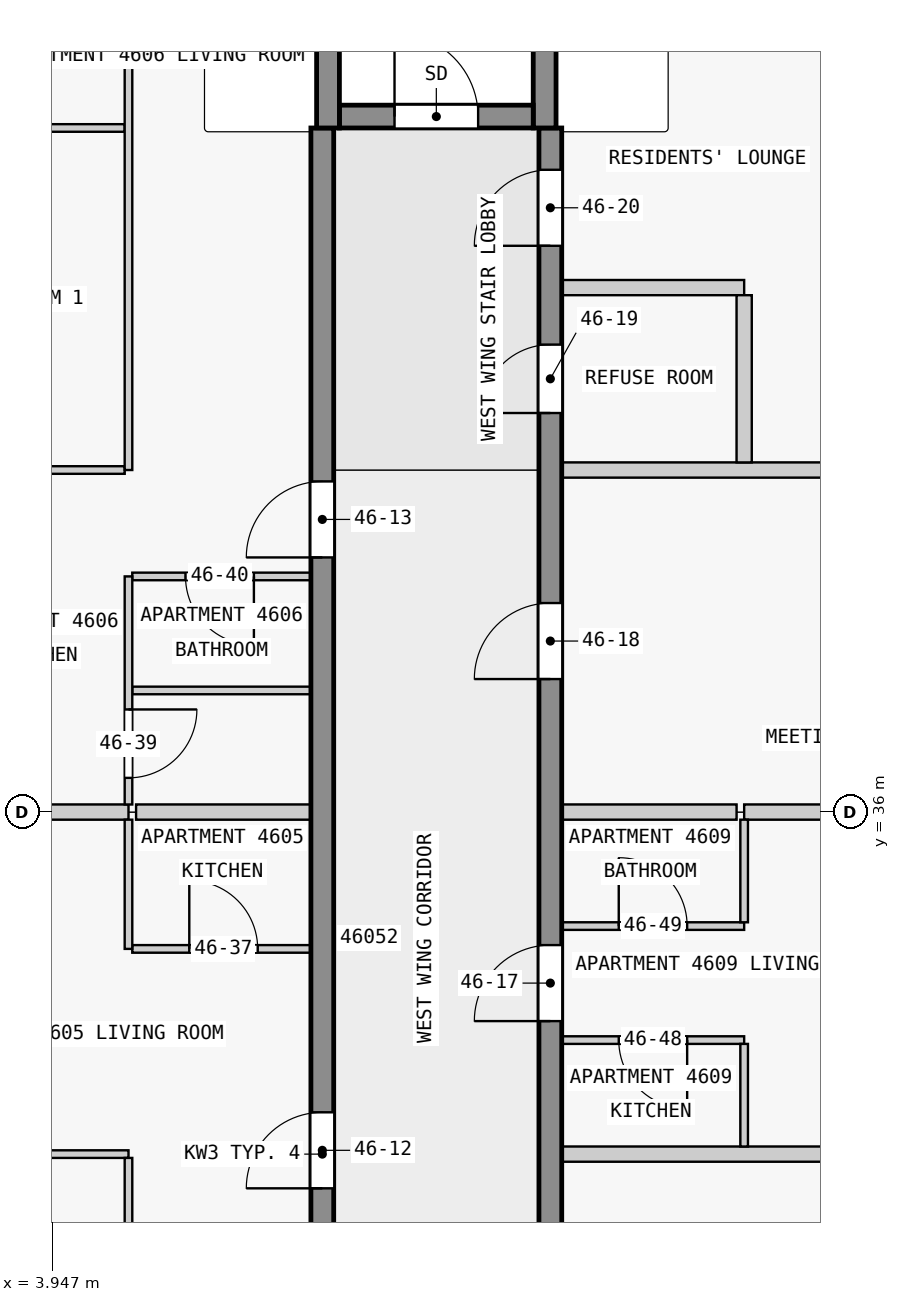
"""IFC4 building model, lengths in metres.
Left out: names, types, materials, properties, quantities, classifications, styles, units other than length and angle.
Written with IfcOpenShell. Run it as: python <this file> out.ifc"""

import sys

from ifc_helpers import new_model, si_unit, direction, frame, frame_2d, origin, place, context, subcontext, project, spatial, rectangle, extrude, element, fill, save


model = new_model("IFC4")
c1 = context("Model", 3, precision=1e-05, world=origin(), true_north=direction((0.0, 1.0)))
c2 = subcontext(c1, "Body", "Model", "MODEL_VIEW")
j1 = project(units=[si_unit("LENGTHUNIT", "METRE"), si_unit("PLANEANGLEUNIT", "RADIAN")], contexts=[c1])
p1 = place(None, origin())
s1 = spatial("IfcSite", under=j1, at=p1, CompositionType="ELEMENT")
p2 = place(p1, origin())
s2 = spatial("IfcBuilding", under=s1, at=p2, CompositionType="ELEMENT")
p3 = place(p2, frame((0.0, 0.0, 177.9)))
s3 = spatial("IfcBuildingStorey", under=s2, at=p3, CompositionType="ELEMENT", Elevation=177.9)
p4 = place(p3, frame((7.725, 45.15, 0.0), z_axis=(0.0, 0.0, 1.0), x_axis=(1.0, 0.0, 0.0)))
e1 = element("IfcWall", 1, at=p4, inside=s3, PredefinedType="SHEAR", context=c2, shape_type="SweptSolid", body=[
    extrude(rectangle(XDim=2.55, YDim=0.3, at=frame_2d((1.275, 0.0))), origin(), (0.0, 0.0, 1.0), 3.5),
])
p5 = place(p4, frame((0.725, 0.0, 0.0)))
e2 = element("IfcOpeningElement", 2, at=p5, cuts=e1, PredefinedType="OPENING", context=c2, shape_type="SweptSolid", body=[
    extrude(rectangle(XDim=1.1, YDim=2.1, at=frame_2d((0.55, 1.05))), frame((0.0, 0.16, 0.0), z_axis=(0.0, -1.0, 0.0), x_axis=(1.0, 0.0, 0.0)), (0.0, 0.0, 1.0), 0.32),
])
for number, where, z_axis, x_axis in (
    (3, (7.575, 45.0, 0.0), (0.0, 0.0, 1.0), (0.0, 1.0, 0.0)),
    (4, (10.425, 45.0, 0.0), (0.0, 0.0, 1.0), (0.0, 1.0, 0.0)),
):
    element("IfcWall", number, at=place(p3, frame(where, z_axis=z_axis, x_axis=x_axis)), inside=s3, PredefinedType="SHEAR", context=c2, shape_type="SweptSolid", body=[
        extrude(rectangle(XDim=7.2, YDim=0.3, at=frame_2d((3.6, 0.0))), origin(), (0.0, 0.0, 1.0), 3.5),
    ])
p6 = place(p3, frame((7.5, 18.0, 0.0), z_axis=(0.0, 0.0, 1.0), x_axis=(0.0, 1.0, 0.0)))
e5 = element("IfcWall", 5, at=p6, inside=s3, PredefinedType="SHEAR", context=c2, shape_type="SweptSolid", body=[
    extrude(rectangle(XDim=27.0, YDim=0.3, at=frame_2d((13.5, 0.0))), origin(), (0.0, 0.0, 1.0), 3.25),
])
p7 = place(p6, frame((1.75, 0.0, 0.0)))
e6 = element("IfcOpeningElement", 6, at=p7, cuts=e5, PredefinedType="OPENING", context=c2, shape_type="SweptSolid", body=[
    extrude(rectangle(XDim=1.0, YDim=2.1, at=frame_2d((0.5, 1.05))), frame((0.0, 0.16, 0.0), z_axis=(0.0, -1.0, 0.0), x_axis=(1.0, 0.0, 0.0)), (0.0, 0.0, 1.0), 0.32),
])
p8 = place(p6, frame((5.85, 0.0, 0.0)))
e7 = element("IfcOpeningElement", 7, at=p8, cuts=e5, PredefinedType="OPENING", context=c2, shape_type="SweptSolid", body=[
    extrude(rectangle(XDim=1.8, YDim=2.1, at=frame_2d((0.9, 1.05))), frame((0.0, 0.16, 0.0), z_axis=(0.0, -1.0, 0.0), x_axis=(1.0, 0.0, 0.0)), (0.0, 0.0, 1.0), 0.32),
])
p9 = place(p6, frame((13.05, 0.0, 0.0)))
e8 = element("IfcOpeningElement", 8, at=p9, cuts=e5, PredefinedType="OPENING", context=c2, shape_type="SweptSolid", body=[
    extrude(rectangle(XDim=1.0, YDim=2.1, at=frame_2d((0.5, 1.05))), frame((0.0, 0.16, 0.0), z_axis=(0.0, -1.0, 0.0), x_axis=(1.0, 0.0, 0.0)), (0.0, 0.0, 1.0), 0.32),
])
p10 = place(p6, frame((21.35, 0.0, 0.0)))
e9 = element("IfcOpeningElement", 9, at=p10, cuts=e5, PredefinedType="OPENING", context=c2, shape_type="SweptSolid", body=[
    extrude(rectangle(XDim=1.0, YDim=2.1, at=frame_2d((0.5, 1.05))), frame((0.0, 0.16, 0.0), z_axis=(0.0, -1.0, 0.0), x_axis=(1.0, 0.0, 0.0)), (0.0, 0.0, 1.0), 0.32),
])
p11 = place(p3, frame((10.5, 18.0, 0.0), z_axis=(0.0, 0.0, 1.0), x_axis=(0.0, 1.0, 0.0)))
e10 = element("IfcWall", 10, at=p11, inside=s3, PredefinedType="SHEAR", context=c2, shape_type="SweptSolid", body=[
    extrude(rectangle(XDim=27.0, YDim=0.3, at=frame_2d((13.5, 0.0))), origin(), (0.0, 0.0, 1.0), 3.25),
])
p12 = place(p11, frame((1.75, 0.0, 0.0)))
e11 = element("IfcOpeningElement", 11, at=p12, cuts=e10, PredefinedType="OPENING", context=c2, shape_type="SweptSolid", body=[
    extrude(rectangle(XDim=1.0, YDim=2.1, at=frame_2d((0.5, 1.05))), frame((0.0, 0.16, 0.0), z_axis=(0.0, -1.0, 0.0), x_axis=(1.0, 0.0, 0.0)), (0.0, 0.0, 1.0), 0.32),
])
p13 = place(p11, frame((6.25, 0.0, 0.0)))
e12 = element("IfcOpeningElement", 12, at=p13, cuts=e10, PredefinedType="OPENING", context=c2, shape_type="SweptSolid", body=[
    extrude(rectangle(XDim=1.0, YDim=2.1, at=frame_2d((0.5, 1.05))), frame((0.0, 0.16, 0.0), z_axis=(0.0, -1.0, 0.0), x_axis=(1.0, 0.0, 0.0)), (0.0, 0.0, 1.0), 0.32),
])
p14 = place(p11, frame((10.75, 0.0, 0.0)))
e13 = element("IfcOpeningElement", 13, at=p14, cuts=e10, PredefinedType="OPENING", context=c2, shape_type="SweptSolid", body=[
    extrude(rectangle(XDim=1.0, YDim=2.1, at=frame_2d((0.5, 1.05))), frame((0.0, 0.16, 0.0), z_axis=(0.0, -1.0, 0.0), x_axis=(1.0, 0.0, 0.0)), (0.0, 0.0, 1.0), 0.32),
])
p15 = place(p11, frame((15.25, 0.0, 0.0)))
e14 = element("IfcOpeningElement", 14, at=p15, cuts=e10, PredefinedType="OPENING", context=c2, shape_type="SweptSolid", body=[
    extrude(rectangle(XDim=1.0, YDim=2.1, at=frame_2d((0.5, 1.05))), frame((0.0, 0.16, 0.0), z_axis=(0.0, -1.0, 0.0), x_axis=(1.0, 0.0, 0.0)), (0.0, 0.0, 1.0), 0.32),
])
p16 = place(p11, frame((19.75, 0.0, 0.0)))
e15 = element("IfcOpeningElement", 15, at=p16, cuts=e10, PredefinedType="OPENING", context=c2, shape_type="SweptSolid", body=[
    extrude(rectangle(XDim=1.0, YDim=2.1, at=frame_2d((0.5, 1.05))), frame((0.0, 0.16, 0.0), z_axis=(0.0, -1.0, 0.0), x_axis=(1.0, 0.0, 0.0)), (0.0, 0.0, 1.0), 0.32),
])
p17 = place(p11, frame((23.25, 0.0, 0.0)))
e16 = element("IfcOpeningElement", 16, at=p17, cuts=e10, PredefinedType="OPENING", context=c2, shape_type="SweptSolid", body=[
    extrude(rectangle(XDim=0.9, YDim=2.1, at=frame_2d((0.45, 1.05))), frame((0.0, 0.16, 0.0), z_axis=(0.0, -1.0, 0.0), x_axis=(1.0, 0.0, 0.0)), (0.0, 0.0, 1.0), 0.32),
])
p18 = place(p11, frame((25.45, 0.0, 0.0)))
e17 = element("IfcOpeningElement", 17, at=p18, cuts=e10, PredefinedType="OPENING", context=c2, shape_type="SweptSolid", body=[
    extrude(rectangle(XDim=1.0, YDim=2.1, at=frame_2d((0.5, 1.05))), frame((0.0, 0.16, 0.0), z_axis=(0.0, -1.0, 0.0), x_axis=(1.0, 0.0, 0.0)), (0.0, 0.0, 1.0), 0.32),
])
p19 = place(p3, frame((4.95, 31.5, 0.0), z_axis=(0.0, 0.0, 1.0), x_axis=(-1.0, 0.0, 0.0)))
e18 = element("IfcWall", 18, at=p19, inside=s3, PredefinedType="PARTITIONING", context=c2, shape_type="SweptSolid", body=[
    extrude(rectangle(XDim=4.8, YDim=0.1, at=frame_2d((2.4, 0.0))), origin(), (0.0, 0.0, 1.0), 3.25),
])
p20 = place(p19, frame((1.95, 0.0, 0.0)))
e19 = element("IfcOpeningElement", 19, at=p20, cuts=e18, PredefinedType="OPENING", context=c2, shape_type="SweptSolid", body=[
    extrude(rectangle(XDim=0.9, YDim=2.1, at=frame_2d((0.45, 1.05))), frame((0.0, 0.06, 0.0), z_axis=(0.0, -1.0, 0.0), x_axis=(1.0, 0.0, 0.0)), (0.0, 0.0, 1.0), 0.12),
])
p21 = place(p3, frame((17.85, 31.5, 0.0), z_axis=(0.0, 0.0, 1.0), x_axis=(-1.0, 0.0, 0.0)))
e20 = element("IfcWall", 20, at=p21, inside=s3, PredefinedType="PARTITIONING", context=c2, shape_type="SweptSolid", body=[
    extrude(rectangle(XDim=7.2, YDim=0.2, at=frame_2d((3.6, 0.0))), origin(), (0.0, 0.0, 1.0), 3.25),
])
p22 = place(p3, frame((13.05, 33.0, 0.0), z_axis=(0.0, 0.0, 1.0), x_axis=(-1.0, 0.0, 0.0)))
e21 = element("IfcWall", 21, at=p22, inside=s3, PredefinedType="PARTITIONING", context=c2, shape_type="SweptSolid", body=[
    extrude(rectangle(XDim=2.4, YDim=0.1, at=frame_2d((1.2, 0.0))), origin(), (0.0, 0.0, 1.0), 3.25),
])
p23 = place(p22, frame((0.75, 0.0, 0.0)))
e22 = element("IfcOpeningElement", 22, at=p23, cuts=e21, PredefinedType="OPENING", context=c2, shape_type="SweptSolid", body=[
    extrude(rectangle(XDim=0.9, YDim=2.1, at=frame_2d((0.45, 1.05))), frame((0.0, 0.06, 0.0), z_axis=(0.0, -1.0, 0.0), x_axis=(1.0, 0.0, 0.0)), (0.0, 0.0, 1.0), 0.12),
])
p24 = place(p3, frame((5.0, 34.2, 0.0), z_axis=(0.0, 0.0, 1.0), x_axis=(1.0, 0.0, 0.0)))
e23 = element("IfcWall", 23, at=p24, inside=s3, PredefinedType="PARTITIONING", context=c2, shape_type="SweptSolid", body=[
    extrude(rectangle(XDim=2.35, YDim=0.1, at=frame_2d((1.175, 0.0))), origin(), (0.0, 0.0, 1.0), 3.25),
])
p25 = place(p24, frame((0.75, 0.0, 0.0)))
e24 = element("IfcOpeningElement", 24, at=p25, cuts=e23, PredefinedType="OPENING", context=c2, shape_type="SweptSolid", body=[
    extrude(rectangle(XDim=0.9, YDim=2.1, at=frame_2d((0.45, 1.05))), frame((0.0, 0.06, 0.0), z_axis=(0.0, -1.0, 0.0), x_axis=(1.0, 0.0, 0.0)), (0.0, 0.0, 1.0), 0.12),
])
p26 = place(p3, frame((10.65, 34.5, 0.0), z_axis=(0.0, 0.0, 1.0), x_axis=(1.0, 0.0, 0.0)))
e25 = element("IfcWall", 25, at=p26, inside=s3, PredefinedType="PARTITIONING", context=c2, shape_type="SweptSolid", body=[
    extrude(rectangle(XDim=2.4, YDim=0.1, at=frame_2d((1.2, 0.0))), origin(), (0.0, 0.0, 1.0), 3.25),
])
p27 = place(p26, frame((0.75, 0.0, 0.0)))
e26 = element("IfcOpeningElement", 26, at=p27, cuts=e25, PredefinedType="OPENING", context=c2, shape_type="SweptSolid", body=[
    extrude(rectangle(XDim=0.9, YDim=2.1, at=frame_2d((0.45, 1.05))), frame((0.0, 0.06, 0.0), z_axis=(0.0, -1.0, 0.0), x_axis=(1.0, 0.0, 0.0)), (0.0, 0.0, 1.0), 0.12),
])
for number, where, z_axis, x_axis in (
    (27, (7.35, 36.0, 0.0), (0.0, 0.0, 1.0), (-1.0, 0.0, 0.0)),
    (28, (12.95, 36.0, 0.0), (0.0, 0.0, 1.0), (-1.0, 0.0, 0.0)),
):
    element("IfcWall", number, at=place(p3, frame(where, z_axis=z_axis, x_axis=x_axis)), inside=s3, PredefinedType="PARTITIONING", context=c2, shape_type="SweptSolid", body=[
        extrude(rectangle(XDim=2.3, YDim=0.2, at=frame_2d((1.15, 0.0))), origin(), (0.0, 0.0, 1.0), 3.25),
    ])
for number, where, z_axis, x_axis in (
    (29, (1.4, 36.0, 0.0), (0.0, 0.0, 1.0), (1.0, 0.0, 0.0)),
    (30, (13.05, 36.0, 0.0), (0.0, 0.0, 1.0), (1.0, 0.0, 0.0)),
):
    element("IfcWall", number, at=place(p3, frame(where, z_axis=z_axis, x_axis=x_axis)), inside=s3, PredefinedType="PARTITIONING", context=c2, shape_type="SweptSolid", body=[
        extrude(rectangle(XDim=3.55, YDim=0.2, at=frame_2d((1.775, 0.0))), origin(), (0.0, 0.0, 1.0), 3.25),
    ])
p28 = place(p3, frame((7.35, 37.6, 0.0), z_axis=(0.0, 0.0, 1.0), x_axis=(-1.0, 0.0, 0.0)))
e31 = element("IfcWall", 31, at=p28, inside=s3, PredefinedType="PARTITIONING", context=c2, shape_type="SweptSolid", body=[
    extrude(rectangle(XDim=2.35, YDim=0.1, at=frame_2d((1.175, 0.0))), origin(), (0.0, 0.0, 1.0), 3.25),
])
p29 = place(p3, frame((7.35, 39.1, 0.0), z_axis=(0.0, 0.0, 1.0), x_axis=(-1.0, 0.0, 0.0)))
e32 = element("IfcWall", 32, at=p29, inside=s3, PredefinedType="PARTITIONING", context=c2, shape_type="SweptSolid", body=[
    extrude(rectangle(XDim=2.35, YDim=0.1, at=frame_2d((1.175, 0.0))), origin(), (0.0, 0.0, 1.0), 3.25),
])
p30 = place(p29, frame((0.75, 0.0, 0.0)))
e33 = element("IfcOpeningElement", 33, at=p30, cuts=e32, PredefinedType="OPENING", context=c2, shape_type="SweptSolid", body=[
    extrude(rectangle(XDim=0.9, YDim=2.1, at=frame_2d((0.45, 1.05))), frame((0.0, 0.06, 0.0), z_axis=(0.0, -1.0, 0.0), x_axis=(1.0, 0.0, 0.0)), (0.0, 0.0, 1.0), 0.12),
])
p31 = place(p3, frame((0.15, 40.5, 0.0), z_axis=(0.0, 0.0, 1.0), x_axis=(1.0, 0.0, 0.0)))
e34 = element("IfcWall", 34, at=p31, inside=s3, PredefinedType="PARTITIONING", context=c2, shape_type="SweptSolid", body=[
    extrude(rectangle(XDim=4.75, YDim=0.1, at=frame_2d((2.375, 0.0))), origin(), (0.0, 0.0, 1.0), 3.25),
])
p32 = place(p31, frame((1.95, 0.0, 0.0)))
e35 = element("IfcOpeningElement", 35, at=p32, cuts=e34, PredefinedType="OPENING", context=c2, shape_type="SweptSolid", body=[
    extrude(rectangle(XDim=0.9, YDim=2.1, at=frame_2d((0.45, 1.05))), frame((0.0, 0.06, 0.0), z_axis=(0.0, -1.0, 0.0), x_axis=(1.0, 0.0, 0.0)), (0.0, 0.0, 1.0), 0.12),
])
p33 = place(p3, frame((18.08, 40.5, 0.0), z_axis=(0.0, 0.0, 1.0), x_axis=(-1.0, 0.0, 0.0)))
e36 = element("IfcWall", 36, at=p33, inside=s3, PredefinedType="PARTITIONING", context=c2, shape_type="SweptSolid", body=[
    extrude(rectangle(XDim=7.43, YDim=0.2, at=frame_2d((3.715, 0.0))), origin(), (0.0, 0.0, 1.0), 3.25),
])
p34 = place(p3, frame((13.05, 42.9, 0.0), z_axis=(0.0, 0.0, 1.0), x_axis=(-1.0, 0.0, 0.0)))
e37 = element("IfcWall", 37, at=p34, inside=s3, PredefinedType="PARTITIONING", context=c2, shape_type="SweptSolid", body=[
    extrude(rectangle(XDim=2.4, YDim=0.2, at=frame_2d((1.2, 0.0))), origin(), (0.0, 0.0, 1.0), 3.25),
])
p35 = place(p3, frame((4.9, 45.0, 0.0), z_axis=(0.0, 0.0, 1.0), x_axis=(-1.0, 0.0, 0.0)))
e38 = element("IfcWall", 38, at=p35, inside=s3, PredefinedType="PARTITIONING", context=c2, shape_type="SweptSolid", body=[
    extrude(rectangle(XDim=4.75, YDim=0.1, at=frame_2d((2.375, 0.0))), origin(), (0.0, 0.0, 1.0), 3.25),
])
p36 = place(p3, frame((4.95, 35.9, 0.0), z_axis=(0.0, 0.0, 1.0), x_axis=(0.0, -1.0, 0.0)))
e39 = element("IfcWall", 39, at=p36, inside=s3, PredefinedType="PARTITIONING", context=c2, shape_type="SweptSolid", body=[
    extrude(rectangle(XDim=1.7, YDim=0.1, at=frame_2d((0.85, 0.0))), origin(), (0.0, 0.0, 1.0), 3.25),
])
p37 = place(p3, frame((4.95, 39.1, 0.0), z_axis=(0.0, 0.0, 1.0), x_axis=(0.0, -1.0, 0.0)))
e40 = element("IfcWall", 40, at=p37, inside=s3, PredefinedType="PARTITIONING", context=c2, shape_type="SweptSolid", body=[
    extrude(rectangle(XDim=3.0, YDim=0.1, at=frame_2d((1.5, 0.0))), origin(), (0.0, 0.0, 1.0), 3.25),
])
p38 = place(p37, frame((1.75, 0.0, 0.0)))
e41 = element("IfcOpeningElement", 41, at=p38, cuts=e40, PredefinedType="OPENING", context=c2, shape_type="SweptSolid", body=[
    extrude(rectangle(XDim=0.9, YDim=2.1, at=frame_2d((0.45, 1.05))), frame((0.0, 0.06, 0.0), z_axis=(0.0, -1.0, 0.0), x_axis=(1.0, 0.0, 0.0)), (0.0, 0.0, 1.0), 0.12),
])
p39 = place(p3, frame((4.95, 28.8, 0.0), z_axis=(0.0, 0.0, 1.0), x_axis=(0.0, 1.0, 0.0)))
e42 = element("IfcWall", 42, at=p39, inside=s3, PredefinedType="PARTITIONING", context=c2, shape_type="SweptSolid", body=[
    extrude(rectangle(XDim=2.65, YDim=0.1, at=frame_2d((1.325, 0.0))), origin(), (0.0, 0.0, 1.0), 3.25),
])
p40 = place(p3, frame((4.95, 40.5, 0.0), z_axis=(0.0, 0.0, 1.0), x_axis=(0.0, 1.0, 0.0)))
e43 = element("IfcWall", 43, at=p40, inside=s3, PredefinedType="PARTITIONING", context=c2, shape_type="SweptSolid", body=[
    extrude(rectangle(XDim=13.58, YDim=0.1, at=frame_2d((6.79, 0.0))), origin(), (0.0, 0.0, 1.0), 3.25),
])
p41 = place(p40, frame((6.35, 0.0, 0.0)))
e44 = element("IfcOpeningElement", 44, at=p41, cuts=e43, PredefinedType="OPENING", context=c2, shape_type="SweptSolid", body=[
    extrude(rectangle(XDim=0.9, YDim=2.1, at=frame_2d((0.45, 1.05))), frame((0.0, 0.06, 0.0), z_axis=(0.0, -1.0, 0.0), x_axis=(1.0, 0.0, 0.0)), (0.0, 0.0, 1.0), 0.12),
])
p42 = place(p40, frame((10.75, 0.0, 0.0)))
e45 = element("IfcOpeningElement", 45, at=p42, cuts=e43, PredefinedType="OPENING", context=c2, shape_type="SweptSolid", body=[
    extrude(rectangle(XDim=0.9, YDim=2.1, at=frame_2d((0.45, 1.05))), frame((0.0, 0.06, 0.0), z_axis=(0.0, -1.0, 0.0), x_axis=(1.0, 0.0, 0.0)), (0.0, 0.0, 1.0), 0.12),
])
for number, where, z_axis, x_axis in (
    (46, (13.05, 31.6, 0.0), (0.0, 0.0, 1.0), (0.0, 1.0, 0.0)),
    (47, (13.05, 34.55, 0.0), (0.0, 0.0, 1.0), (0.0, 1.0, 0.0)),
):
    element("IfcWall", number, at=place(p3, frame(where, z_axis=z_axis, x_axis=x_axis)), inside=s3, PredefinedType="PARTITIONING", context=c2, shape_type="SweptSolid", body=[
        extrude(rectangle(XDim=1.35, YDim=0.1, at=frame_2d((0.675, 0.0))), origin(), (0.0, 0.0, 1.0), 3.25),
    ])
p43 = place(p3, frame((13.05, 40.6, 0.0), z_axis=(0.0, 0.0, 1.0), x_axis=(0.0, 1.0, 0.0)))
e48 = element("IfcWall", 48, at=p43, inside=s3, PredefinedType="PARTITIONING", context=c2, shape_type="SweptSolid", body=[
    extrude(rectangle(XDim=2.2, YDim=0.2, at=frame_2d((1.1, 0.0))), origin(), (0.0, 0.0, 1.0), 3.25),
])
p44 = place(p5, origin())
e49 = element("IfcDoor", 49, at=p44, inside=s3, OperationType="SINGLE_SWING_LEFT", PredefinedType="DOOR", context=c2, shape_type="SweptSolid", body=[
    extrude(rectangle(XDim=1.1, YDim=2.1, at=frame_2d((0.55, 1.05))), frame((0.0, 0.025, 0.0), z_axis=(0.0, -1.0, 0.0), x_axis=(1.0, 0.0, 0.0)), (0.0, 0.0, 1.0), 0.05),
])
fill(e2, e49)
p45 = place(p9, origin())
e50 = element("IfcDoor", 50, at=p45, inside=s3, OperationType="SINGLE_SWING_RIGHT", PredefinedType="DOOR", context=c2, shape_type="SweptSolid", body=[
    extrude(rectangle(XDim=1.0, YDim=2.1, at=frame_2d((0.5, 1.05))), frame((0.0, 0.025, 0.0), z_axis=(0.0, -1.0, 0.0), x_axis=(1.0, 0.0, 0.0)), (0.0, 0.0, 1.0), 0.05),
])
fill(e8, e50)
p46 = place(p10, origin())
e51 = element("IfcDoor", 51, at=p46, inside=s3, OperationType="SINGLE_SWING_RIGHT", PredefinedType="DOOR", context=c2, shape_type="SweptSolid", body=[
    extrude(rectangle(XDim=1.0, YDim=2.1, at=frame_2d((0.5, 1.05))), frame((0.0, 0.025, 0.0), z_axis=(0.0, -1.0, 0.0), x_axis=(1.0, 0.0, 0.0)), (0.0, 0.0, 1.0), 0.05),
])
fill(e9, e51)
p47 = place(p15, origin())
e52 = element("IfcDoor", 52, at=p47, inside=s3, OperationType="SINGLE_SWING_RIGHT", PredefinedType="DOOR", context=c2, shape_type="SweptSolid", body=[
    extrude(rectangle(XDim=1.0, YDim=2.1, at=frame_2d((0.5, 1.05))), frame((0.0, 0.025, 0.0), z_axis=(0.0, -1.0, 0.0), x_axis=(1.0, 0.0, 0.0)), (0.0, 0.0, 1.0), 0.05),
])
fill(e14, e52)
p48 = place(p16, origin())
e53 = element("IfcDoor", 53, at=p48, inside=s3, OperationType="SINGLE_SWING_RIGHT", PredefinedType="DOOR", context=c2, shape_type="SweptSolid", body=[
    extrude(rectangle(XDim=1.0, YDim=2.1, at=frame_2d((0.5, 1.05))), frame((0.0, 0.025, 0.0), z_axis=(0.0, -1.0, 0.0), x_axis=(1.0, 0.0, 0.0)), (0.0, 0.0, 1.0), 0.05),
])
fill(e15, e53)
p49 = place(p17, origin())
e54 = element("IfcDoor", 54, at=p49, inside=s3, OperationType="SINGLE_SWING_RIGHT", PredefinedType="DOOR", context=c2, shape_type="SweptSolid", body=[
    extrude(rectangle(XDim=0.9, YDim=2.1, at=frame_2d((0.45, 1.05))), frame((0.0, 0.025, 0.0), z_axis=(0.0, -1.0, 0.0), x_axis=(1.0, 0.0, 0.0)), (0.0, 0.0, 1.0), 0.05),
])
fill(e16, e54)
p50 = place(p18, origin())
e55 = element("IfcDoor", 55, at=p50, inside=s3, OperationType="SINGLE_SWING_RIGHT", PredefinedType="DOOR", context=c2, shape_type="SweptSolid", body=[
    extrude(rectangle(XDim=1.0, YDim=2.1, at=frame_2d((0.5, 1.05))), frame((0.0, 0.025, 0.0), z_axis=(0.0, -1.0, 0.0), x_axis=(1.0, 0.0, 0.0)), (0.0, 0.0, 1.0), 0.05),
])
fill(e17, e55)
p51 = place(p25, origin())
e56 = element("IfcDoor", 56, at=p51, inside=s3, OperationType="SINGLE_SWING_RIGHT", PredefinedType="DOOR", context=c2, shape_type="SweptSolid", body=[
    extrude(rectangle(XDim=0.9, YDim=2.1, at=frame_2d((0.45, 1.05))), frame((0.0, 0.025, 0.0), z_axis=(0.0, -1.0, 0.0), x_axis=(1.0, 0.0, 0.0)), (0.0, 0.0, 1.0), 0.05),
])
fill(e24, e56)
p52 = place(p38, origin())
e57 = element("IfcDoor", 57, at=p52, inside=s3, OperationType="SINGLE_SWING_RIGHT", PredefinedType="DOOR", context=c2, shape_type="SweptSolid", body=[
    extrude(rectangle(XDim=0.9, YDim=2.1, at=frame_2d((0.45, 1.05))), frame((0.0, 0.025, 0.0), z_axis=(0.0, -1.0, 0.0), x_axis=(1.0, 0.0, 0.0)), (0.0, 0.0, 1.0), 0.05),
])
fill(e41, e57)
p53 = place(p30, origin())
e58 = element("IfcDoor", 58, at=p53, inside=s3, OperationType="SINGLE_SWING_RIGHT", PredefinedType="DOOR", context=c2, shape_type="SweptSolid", body=[
    extrude(rectangle(XDim=0.9, YDim=2.1, at=frame_2d((0.45, 1.05))), frame((0.0, 0.025, 0.0), z_axis=(0.0, -1.0, 0.0), x_axis=(1.0, 0.0, 0.0)), (0.0, 0.0, 1.0), 0.05),
])
fill(e33, e58)
p54 = place(p23, origin())
e59 = element("IfcDoor", 59, at=p54, inside=s3, OperationType="SINGLE_SWING_LEFT", PredefinedType="DOOR", context=c2, shape_type="SweptSolid", body=[
    extrude(rectangle(XDim=0.9, YDim=2.1, at=frame_2d((0.45, 1.05))), frame((0.0, 0.025, 0.0), z_axis=(0.0, -1.0, 0.0), x_axis=(1.0, 0.0, 0.0)), (0.0, 0.0, 1.0), 0.05),
])
fill(e22, e59)
p55 = place(p27, origin())
e60 = element("IfcDoor", 60, at=p55, inside=s3, OperationType="SINGLE_SWING_LEFT", PredefinedType="DOOR", context=c2, shape_type="SweptSolid", body=[
    extrude(rectangle(XDim=0.9, YDim=2.1, at=frame_2d((0.45, 1.05))), frame((0.0, 0.025, 0.0), z_axis=(0.0, -1.0, 0.0), x_axis=(1.0, 0.0, 0.0)), (0.0, 0.0, 1.0), 0.05),
])
fill(e26, e60)
save(model, sys.argv[1])
